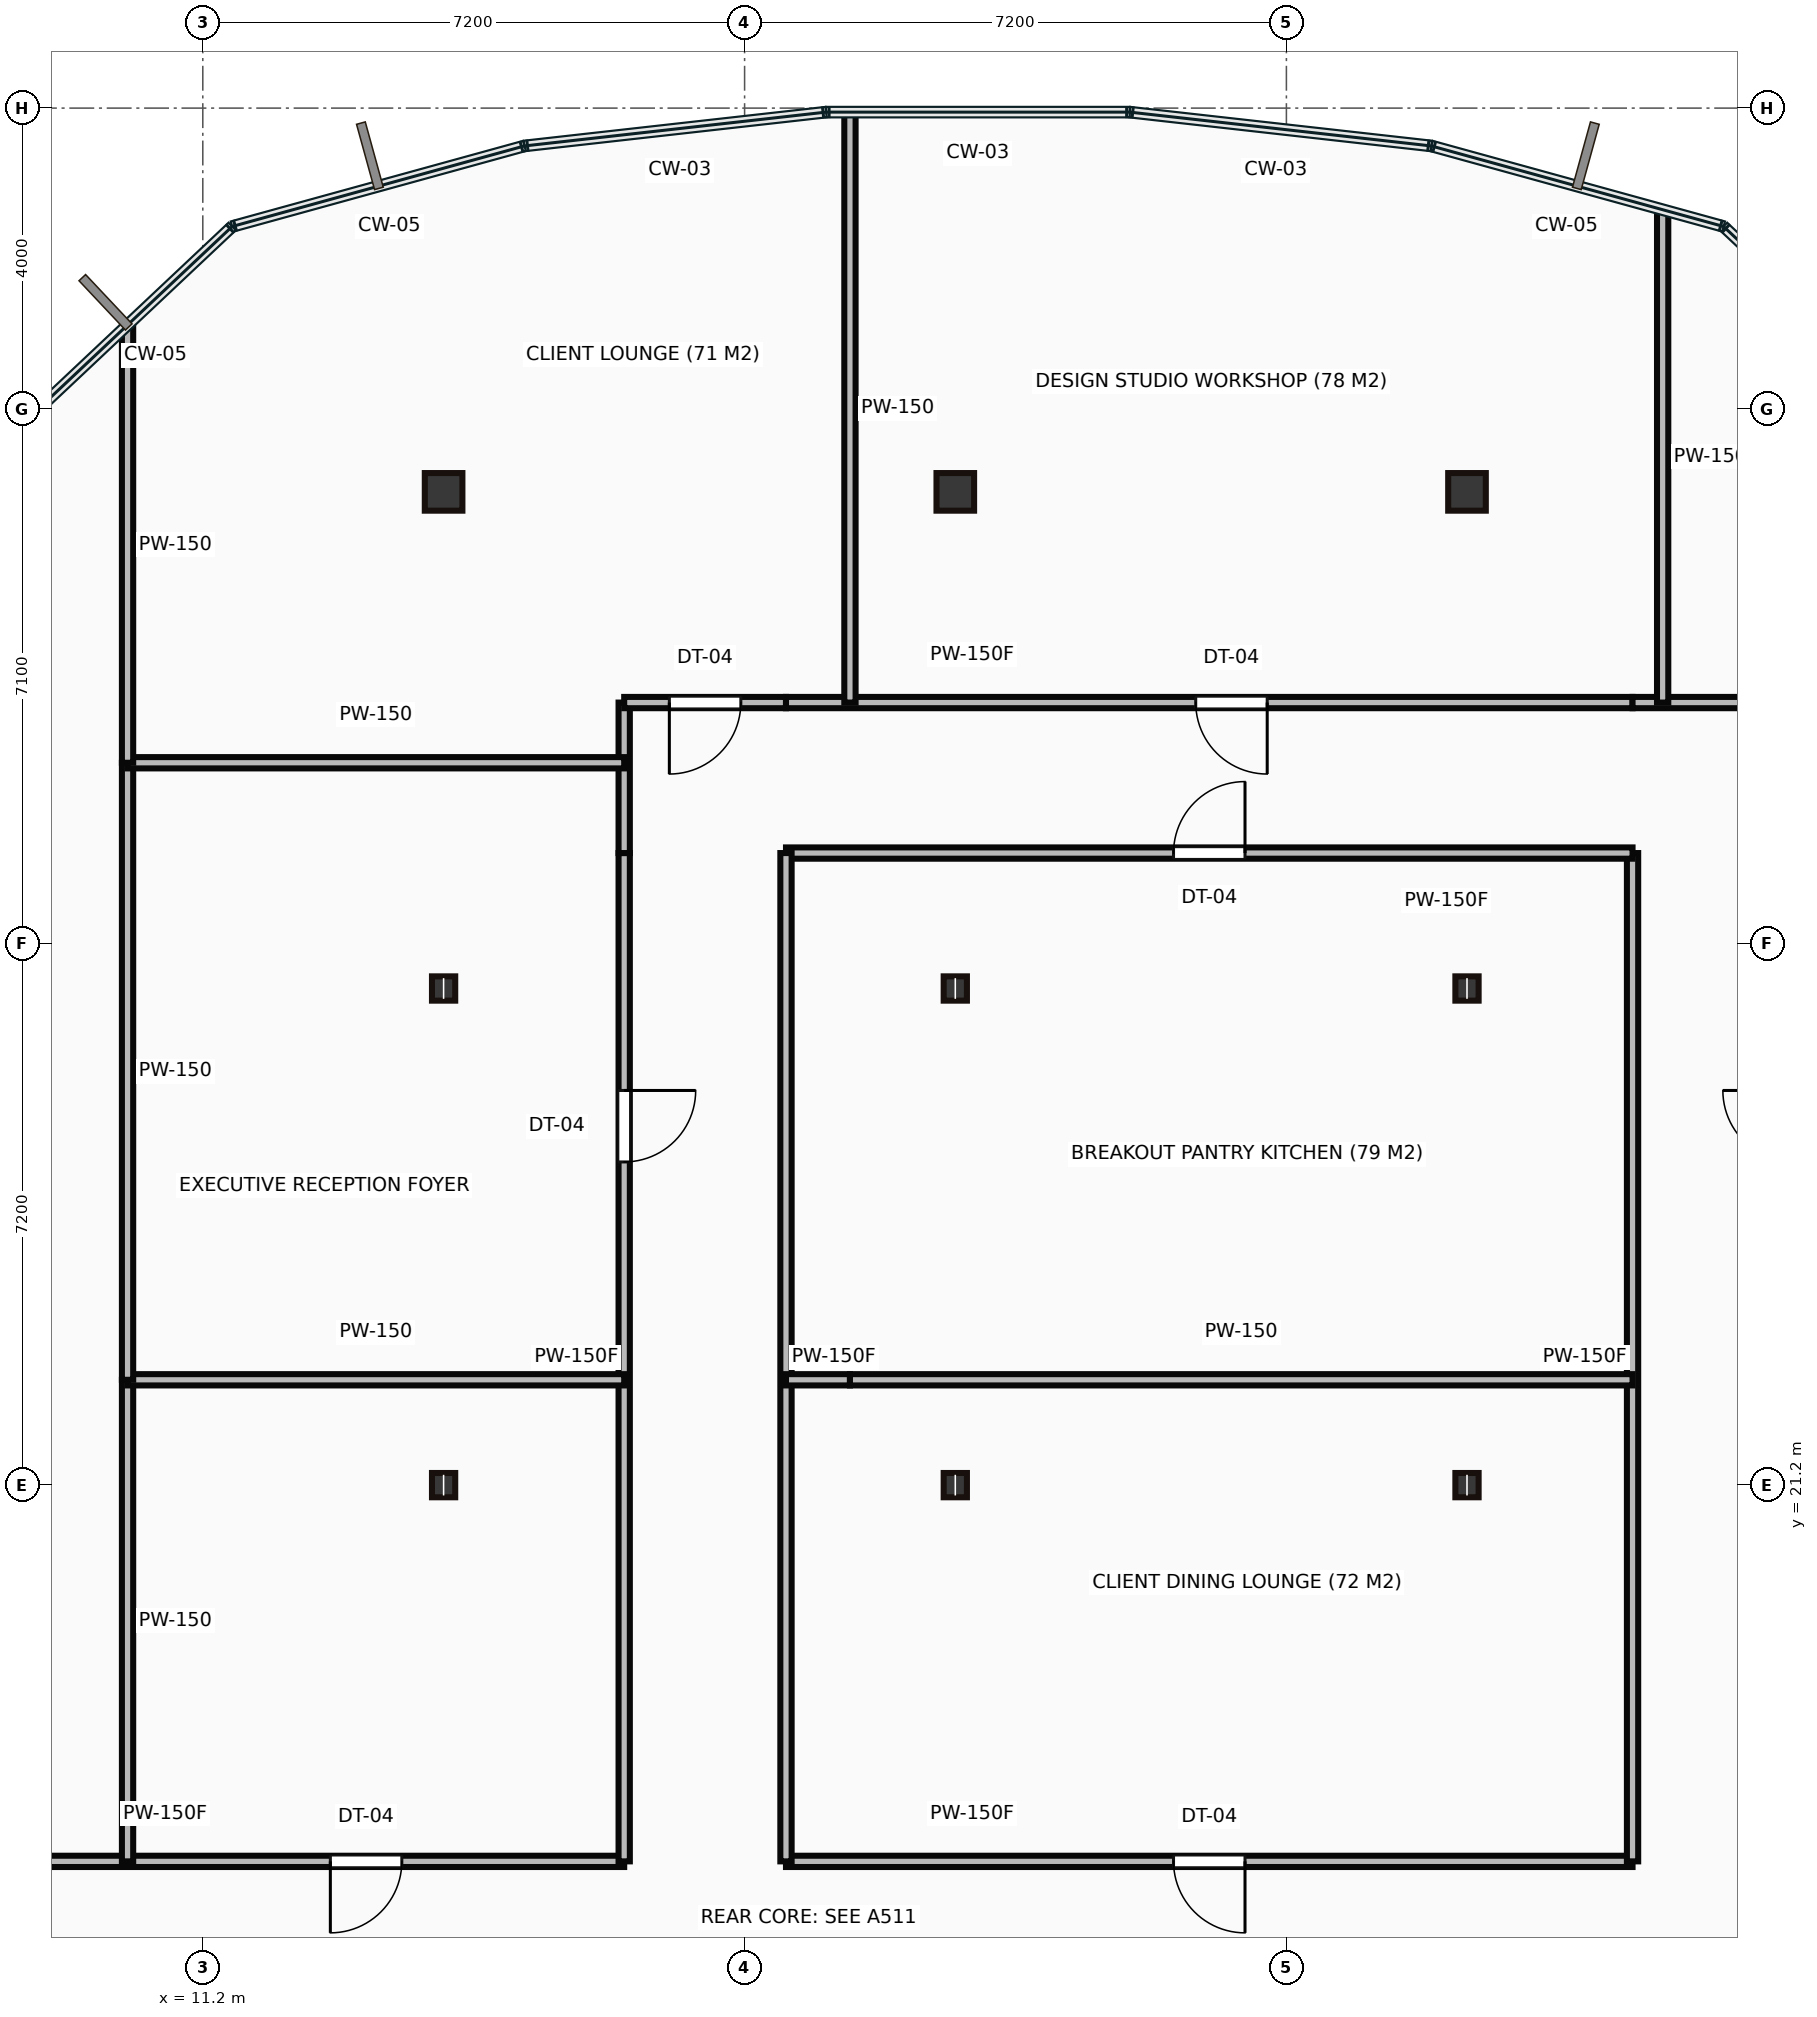
"""IFC4 building model, lengths in metres.
Left out: names, types, materials, properties, quantities, classifications, styles, units other than length and angle.
Written with IfcOpenShell. Run it as: python <this file> out.ifc"""

import sys

from ifc_helpers import new_model, si_unit, direction, frame, frame_2d, origin, origin_2d, place, context, subcontext, project, spatial, rectangle, hollow_rectangle, i_section, extrude, source, transform, mapped, element, fill, save


model = new_model("IFC4")
c1 = context("Model", 3, precision=1e-05, world=origin(), true_north=direction((0.0, 1.0)))
c2 = subcontext(c1, "Body", "Model", "MODEL_VIEW")
j1 = project(units=[si_unit("LENGTHUNIT", "METRE"), si_unit("PLANEANGLEUNIT", "RADIAN")], contexts=[c1])
p1 = place(None, origin())
s1 = spatial("IfcSite", under=j1, at=p1, CompositionType="ELEMENT")
p2 = place(p1, origin())
s2 = spatial("IfcBuilding", under=s1, at=p2, CompositionType="ELEMENT")
p3 = place(p2, frame((0.0, 0.0, 269.75)))
s3 = spatial("IfcBuildingStorey", under=s2, at=p3, CompositionType="ELEMENT", Elevation=269.75)
m1 = source(origin(), c2, "Body", "SweptSolid", [
    extrude(i_section(OverallWidth=0.309, OverallDepth=0.323, WebThickness=0.014, FlangeThickness=0.023, at=origin_2d()), origin(), (0.0, 0.0, 1.0), 3.65),
])
for number, where, z_axis, x_axis in (
    (1, (14.4, 21.2, 0.0), (0.0, 0.0, 1.0), (1.0, 0.0, 0.0)),
    (2, (14.4, 27.8, 0.0), (0.0, 0.0, 1.0), (1.0, 0.0, 0.0)),
):
    element("IfcColumn", number, at=place(p3, frame(where, z_axis=z_axis, x_axis=x_axis)), inside=s3, PredefinedType="COLUMN", context=c2, shape_type="MappedRepresentation", body=[
        mapped(m1, transform((0.0, 0.0, 0.0))),
    ])
m2 = source(origin(), c2, "Body", "SweptSolid", [
    extrude(hollow_rectangle(XDim=0.5, YDim=0.5, WallThickness=0.022, at=origin_2d()), origin(), (0.0, 0.0, 1.0), 3.65),
])
p4 = place(p3, frame((14.4, 34.4, 0.0), z_axis=(0.0, 0.0, 1.0), x_axis=(1.0, 0.0, 0.0)))
e3 = element("IfcColumn", 3, at=p4, inside=s3, PredefinedType="COLUMN", context=c2, shape_type="MappedRepresentation", body=[
    mapped(m2, transform((0.0, 0.0, 0.0))),
])
for number, where, z_axis, x_axis in (
    (4, (21.2, 21.2, 0.0), (0.0, 0.0, 1.0), (1.0, 0.0, 0.0)),
    (5, (21.2, 27.8, 0.0), (0.0, 0.0, 1.0), (1.0, 0.0, 0.0)),
):
    element("IfcColumn", number, at=place(p3, frame(where, z_axis=z_axis, x_axis=x_axis)), inside=s3, PredefinedType="COLUMN", context=c2, shape_type="MappedRepresentation", body=[
        mapped(m1, transform((0.0, 0.0, 0.0))),
    ])
p5 = place(p3, frame((21.2, 34.4, 0.0), z_axis=(0.0, 0.0, 1.0), x_axis=(1.0, 0.0, 0.0)))
e6 = element("IfcColumn", 6, at=p5, inside=s3, PredefinedType="COLUMN", context=c2, shape_type="MappedRepresentation", body=[
    mapped(m2, transform((0.0, 0.0, 0.0))),
])
for number, where, z_axis, x_axis in (
    (7, (28.0, 21.2, 0.0), (0.0, 0.0, 1.0), (1.0, 0.0, 0.0)),
    (8, (28.0, 27.8, 0.0), (0.0, 0.0, 1.0), (1.0, 0.0, 0.0)),
):
    element("IfcColumn", number, at=place(p3, frame(where, z_axis=z_axis, x_axis=x_axis)), inside=s3, PredefinedType="COLUMN", context=c2, shape_type="MappedRepresentation", body=[
        mapped(m1, transform((0.0, 0.0, 0.0))),
    ])
p6 = place(p3, frame((28.0, 34.4, 0.0), z_axis=(0.0, 0.0, 1.0), x_axis=(1.0, 0.0, 0.0)))
e9 = element("IfcColumn", 9, at=p6, inside=s3, PredefinedType="COLUMN", context=c2, shape_type="MappedRepresentation", body=[
    mapped(m2, transform((0.0, 0.0, 0.0))),
])
m3 = source(origin(), c2, "Body", "SweptSolid", [
    extrude(rectangle(XDim=12.2, YDim=0.15, at=frame_2d((6.1, 0.0))), origin(), (0.0, 0.0, 1.0), 3.4),
])
p7 = place(p3, frame((4.6, 16.2, 0.0), z_axis=(0.0, 0.0, 1.0), x_axis=(1.0, 0.0, 0.0)))
e10 = element("IfcWall", 10, at=p7, inside=s3, PredefinedType="PARTITIONING", context=c2, shape_type="MappedRepresentation", body=[
    mapped(m3, transform((0.0, 0.0, 0.0))),
])
p8 = place(p7, frame((2.455, 0.0, 0.0)))
e11 = element("IfcOpeningElement", 11, at=p8, cuts=e10, PredefinedType="OPENING", context=c2, shape_type="SweptSolid", body=[
    extrude(rectangle(XDim=0.95, YDim=2.15, at=frame_2d((0.475, 1.075))), frame((0.0, 0.085, 0.0), z_axis=(0.0, -1.0, 0.0), x_axis=(1.0, 0.0, 0.0)), (0.0, 0.0, 1.0), 0.17),
])
p9 = place(p7, frame((8.295, 0.0, 0.0)))
e12 = element("IfcOpeningElement", 12, at=p9, cuts=e10, PredefinedType="OPENING", context=c2, shape_type="SweptSolid", body=[
    extrude(rectangle(XDim=0.95, YDim=2.15, at=frame_2d((0.475, 1.075))), frame((0.0, 0.085, 0.0), z_axis=(0.0, -1.0, 0.0), x_axis=(1.0, 0.0, 0.0)), (0.0, 0.0, 1.0), 0.17),
])
m4 = source(origin(), c2, "Body", "SweptSolid", [
    extrude(rectangle(XDim=13.4, YDim=0.15, at=frame_2d((6.7, 0.0))), origin(), (0.0, 0.0, 1.0), 3.4),
])
p10 = place(p3, frame((16.8, 16.2, 0.0), z_axis=(0.0, 0.0, 1.0), x_axis=(0.0, 1.0, 0.0)))
e13 = element("IfcWall", 13, at=p10, inside=s3, PredefinedType="PARTITIONING", context=c2, shape_type="MappedRepresentation", body=[
    mapped(m4, transform((0.0, 0.0, 0.0))),
])
p11 = place(p10, frame((9.295, 0.0, 0.0)))
e14 = element("IfcOpeningElement", 14, at=p11, cuts=e13, PredefinedType="OPENING", context=c2, shape_type="SweptSolid", body=[
    extrude(rectangle(XDim=0.95, YDim=2.15, at=frame_2d((0.475, 1.075))), frame((0.0, 0.085, 0.0), z_axis=(0.0, -1.0, 0.0), x_axis=(1.0, 0.0, 0.0)), (0.0, 0.0, 1.0), 0.17),
])
m5 = source(origin(), c2, "Body", "SweptSolid", [
    extrude(rectangle(XDim=2.0, YDim=0.15, at=frame_2d((1.0, 0.0))), origin(), (0.0, 0.0, 1.0), 3.4),
])
p12 = place(p3, frame((16.8, 29.6, 0.0), z_axis=(0.0, 0.0, 1.0), x_axis=(0.0, 1.0, 0.0)))
e15 = element("IfcWall", 15, at=p12, inside=s3, PredefinedType="PARTITIONING", context=c2, shape_type="MappedRepresentation", body=[
    mapped(m5, transform((0.0, 0.0, 0.0))),
])
m6 = source(origin(), c2, "Body", "SweptSolid", [
    extrude(rectangle(XDim=2.15, YDim=0.15, at=frame_2d((1.075, 0.0))), origin(), (0.0, 0.0, 1.0), 3.4),
])
p13 = place(p3, frame((16.8, 31.6, 0.0), z_axis=(0.0, 0.0, 1.0), x_axis=(1.0, 0.0, 0.0)))
e16 = element("IfcWall", 16, at=p13, inside=s3, PredefinedType="PARTITIONING", context=c2, shape_type="MappedRepresentation", body=[
    mapped(m6, transform((0.0, 0.0, 0.0))),
])
p14 = place(p13, frame((0.6, 0.0, 0.0)))
e17 = element("IfcOpeningElement", 17, at=p14, cuts=e16, PredefinedType="OPENING", context=c2, shape_type="SweptSolid", body=[
    extrude(rectangle(XDim=0.95, YDim=2.15, at=frame_2d((0.475, 1.075))), frame((0.0, 0.085, 0.0), z_axis=(0.0, -1.0, 0.0), x_axis=(1.0, 0.0, 0.0)), (0.0, 0.0, 1.0), 0.17),
])
m7 = source(origin(), c2, "Body", "SweptSolid", [
    extrude(rectangle(XDim=11.25, YDim=0.15, at=frame_2d((5.625, 0.0))), origin(), (0.0, 0.0, 1.0), 3.4),
])
p15 = place(p3, frame((18.95, 31.6, 0.0), z_axis=(0.0, 0.0, 1.0), x_axis=(1.0, 0.0, 0.0)))
e18 = element("IfcWall", 18, at=p15, inside=s3, PredefinedType="PARTITIONING", context=c2, shape_type="MappedRepresentation", body=[
    mapped(m7, transform((0.0, 0.0, 0.0))),
])
p16 = place(p15, frame((5.445, 0.0, 0.0)))
e19 = element("IfcOpeningElement", 19, at=p16, cuts=e18, PredefinedType="OPENING", context=c2, shape_type="SweptSolid", body=[
    extrude(rectangle(XDim=0.95, YDim=2.15, at=frame_2d((0.475, 1.075))), frame((0.0, 0.085, 0.0), z_axis=(0.0, -1.0, 0.0), x_axis=(1.0, 0.0, 0.0)), (0.0, 0.0, 1.0), 0.17),
])
m8 = source(origin(), c2, "Body", "SweptSolid", [
    extrude(rectangle(XDim=2.15, YDim=0.15, at=frame_2d((1.075, 0.0))), origin(), (0.0, 0.0, 1.0), 3.4),
])
p17 = place(p3, frame((30.2, 31.6, 0.0), z_axis=(0.0, 0.0, 1.0), x_axis=(1.0, 0.0, 0.0)))
e20 = element("IfcWall", 20, at=p17, inside=s3, PredefinedType="PARTITIONING", context=c2, shape_type="MappedRepresentation", body=[
    mapped(m8, transform((0.0, 0.0, 0.0))),
])
p18 = place(p3, frame((18.95, 16.2, 0.0), z_axis=(0.0, 0.0, 1.0), x_axis=(1.0, 0.0, 0.0)))
e21 = element("IfcWall", 21, at=p18, inside=s3, PredefinedType="PARTITIONING", context=c2, shape_type="MappedRepresentation", body=[
    mapped(m7, transform((0.0, 0.0, 0.0))),
])
p19 = place(p18, frame((5.15, 0.0, 0.0)))
e22 = element("IfcOpeningElement", 22, at=p19, cuts=e21, PredefinedType="OPENING", context=c2, shape_type="SweptSolid", body=[
    extrude(rectangle(XDim=0.95, YDim=2.15, at=frame_2d((0.475, 1.075))), frame((0.0, 0.085, 0.0), z_axis=(0.0, -1.0, 0.0), x_axis=(1.0, 0.0, 0.0)), (0.0, 0.0, 1.0), 0.17),
])
p20 = place(p3, frame((30.2, 16.2, 0.0), z_axis=(0.0, 0.0, 1.0), x_axis=(0.0, 1.0, 0.0)))
e23 = element("IfcWall", 23, at=p20, inside=s3, PredefinedType="PARTITIONING", context=c2, shape_type="MappedRepresentation", body=[
    mapped(m4, transform((0.0, 0.0, 0.0))),
])
p21 = place(p3, frame((30.2, 29.6, 0.0), z_axis=(0.0, 0.0, 1.0), x_axis=(-1.0, 0.0, 0.0)))
e24 = element("IfcWall", 24, at=p21, inside=s3, PredefinedType="PARTITIONING", context=c2, shape_type="MappedRepresentation", body=[
    mapped(m7, transform((0.0, 0.0, 0.0))),
])
p22 = place(p21, frame((5.15, 0.0, 0.0)))
e25 = element("IfcOpeningElement", 25, at=p22, cuts=e24, PredefinedType="OPENING", context=c2, shape_type="SweptSolid", body=[
    extrude(rectangle(XDim=0.95, YDim=2.15, at=frame_2d((0.475, 1.075))), frame((0.0, 0.085, 0.0), z_axis=(0.0, -1.0, 0.0), x_axis=(1.0, 0.0, 0.0)), (0.0, 0.0, 1.0), 0.17),
])
p23 = place(p3, frame((18.95, 29.6, 0.0), z_axis=(0.0, 0.0, 1.0), x_axis=(0.0, -1.0, 0.0)))
e26 = element("IfcWall", 26, at=p23, inside=s3, PredefinedType="PARTITIONING", context=c2, shape_type="MappedRepresentation", body=[
    mapped(m4, transform((0.0, 0.0, 0.0))),
])
m9 = source(origin(), c2, "Body", "SweptSolid", [
    extrude(rectangle(XDim=6.4, YDim=0.15, at=frame_2d((3.2, 0.0))), origin(), (0.0, 0.0, 1.0), 3.4),
])
p24 = place(p3, frame((10.2, 22.6, 0.0), z_axis=(0.0, 0.0, 1.0), x_axis=(0.0, -1.0, 0.0)))
e27 = element("IfcWall", 27, at=p24, inside=s3, PredefinedType="PARTITIONING", context=c2, shape_type="MappedRepresentation", body=[
    mapped(m9, transform((0.0, 0.0, 0.0))),
])
m10 = source(origin(), c2, "Body", "SweptSolid", [
    extrude(rectangle(XDim=6.6, YDim=0.15, at=frame_2d((3.3, 0.0))), origin(), (0.0, 0.0, 1.0), 3.4),
])
p25 = place(p3, frame((10.2, 22.6, 0.0), z_axis=(0.0, 0.0, 1.0), x_axis=(1.0, 0.0, 0.0)))
e28 = element("IfcWall", 28, at=p25, inside=s3, PredefinedType="PARTITIONING", context=c2, shape_type="MappedRepresentation", body=[
    mapped(m10, transform((0.0, 0.0, 0.0))),
])
m11 = source(origin(), c2, "Body", "SweptSolid", [
    extrude(rectangle(XDim=8.2, YDim=0.15, at=frame_2d((4.1, 0.0))), origin(), (0.0, 0.0, 1.0), 3.4),
])
p26 = place(p3, frame((10.2, 30.8, 0.0), z_axis=(0.0, 0.0, 1.0), x_axis=(0.0, -1.0, 0.0)))
e29 = element("IfcWall", 29, at=p26, inside=s3, PredefinedType="PARTITIONING", context=c2, shape_type="MappedRepresentation", body=[
    mapped(m11, transform((0.0, 0.0, 0.0))),
])
p27 = place(p3, frame((10.2, 30.8, 0.0), z_axis=(0.0, 0.0, 1.0), x_axis=(1.0, 0.0, 0.0)))
e30 = element("IfcWall", 30, at=p27, inside=s3, PredefinedType="PARTITIONING", context=c2, shape_type="MappedRepresentation", body=[
    mapped(m10, transform((0.0, 0.0, 0.0))),
])
m12 = source(origin(), c2, "Body", "SweptSolid", [
    extrude(rectangle(XDim=5.79, YDim=0.15, at=frame_2d((2.895, 0.0))), origin(), (0.0, 0.0, 1.0), 3.4),
])
p28 = place(p3, frame((10.2, 36.59, 0.0), z_axis=(0.0, 0.0, 1.0), x_axis=(0.0, -1.0, 0.0)))
e31 = element("IfcWall", 31, at=p28, inside=s3, PredefinedType="PARTITIONING", context=c2, shape_type="MappedRepresentation", body=[
    mapped(m12, transform((0.0, 0.0, 0.0))),
])
m13 = source(origin(), c2, "Body", "SweptSolid", [
    extrude(rectangle(XDim=0.85, YDim=0.15, at=frame_2d((0.425, 0.0))), origin(), (0.0, 0.0, 1.0), 3.4),
])
p29 = place(p3, frame((18.95, 22.6, 0.0), z_axis=(0.0, 0.0, 1.0), x_axis=(1.0, 0.0, 0.0)))
e32 = element("IfcWall", 32, at=p29, inside=s3, PredefinedType="PARTITIONING", context=c2, shape_type="MappedRepresentation", body=[
    mapped(m13, transform((0.0, 0.0, 0.0))),
])
m14 = source(origin(), c2, "Body", "SweptSolid", [
    extrude(rectangle(XDim=10.4, YDim=0.15, at=frame_2d((5.2, 0.0))), origin(), (0.0, 0.0, 1.0), 3.4),
])
p30 = place(p3, frame((19.8, 22.6, 0.0), z_axis=(0.0, 0.0, 1.0), x_axis=(1.0, 0.0, 0.0)))
e33 = element("IfcWall", 33, at=p30, inside=s3, PredefinedType="PARTITIONING", context=c2, shape_type="MappedRepresentation", body=[
    mapped(m14, transform((0.0, 0.0, 0.0))),
])
m15 = source(origin(), c2, "Body", "SweptSolid", [
    extrude(rectangle(XDim=7.827, YDim=0.15, at=frame_2d((3.913, 0.0))), origin(), (0.0, 0.0, 1.0), 3.4),
])
p31 = place(p3, frame((19.8, 39.427, 0.0), z_axis=(0.0, 0.0, 1.0), x_axis=(0.0, -1.0, 0.0)))
e34 = element("IfcWall", 34, at=p31, inside=s3, PredefinedType="PARTITIONING", context=c2, shape_type="MappedRepresentation", body=[
    mapped(m15, transform((0.0, 0.0, 0.0))),
])
m16 = source(origin(), c2, "Body", "SweptSolid", [
    extrude(rectangle(XDim=6.529, YDim=0.15, at=frame_2d((3.265, 0.0))), origin(), (0.0, 0.0, 1.0), 3.4),
])
p32 = place(p3, frame((30.6, 38.129, 0.0), z_axis=(0.0, 0.0, 1.0), x_axis=(0.0, -1.0, 0.0)))
e35 = element("IfcWall", 35, at=p32, inside=s3, PredefinedType="PARTITIONING", context=c2, shape_type="MappedRepresentation", body=[
    mapped(m16, transform((0.0, 0.0, 0.0))),
])
m17 = source(origin(), c2, "Body", "SweptSolid", [
    extrude(rectangle(XDim=0.95, YDim=2.15, at=frame_2d((0.475, 1.075))), frame((0.0, 0.025, 0.0), z_axis=(0.0, -1.0, 0.0), x_axis=(1.0, 0.0, 0.0)), (0.0, 0.0, 1.0), 0.05),
])
p33 = place(p9, origin())
e36 = element("IfcDoor", 36, at=p33, inside=s3, OperationType="SINGLE_SWING_LEFT", PredefinedType="DOOR", context=c2, shape_type="MappedRepresentation", body=[
    mapped(m17, transform((0.0, 0.0, 0.0))),
])
fill(e12, e36)
p34 = place(p11, origin())
e37 = element("IfcDoor", 37, at=p34, inside=s3, OperationType="SINGLE_SWING_RIGHT", PredefinedType="DOOR", context=c2, shape_type="MappedRepresentation", body=[
    mapped(m17, transform((0.0, 0.0, 0.0))),
])
fill(e14, e37)
p35 = place(p14, origin())
e38 = element("IfcDoor", 38, at=p35, inside=s3, OperationType="SINGLE_SWING_LEFT", PredefinedType="DOOR", context=c2, shape_type="MappedRepresentation", body=[
    mapped(m17, transform((0.0, 0.0, 0.0))),
])
fill(e17, e38)
p36 = place(p19, origin())
e39 = element("IfcDoor", 39, at=p36, inside=s3, OperationType="SINGLE_SWING_RIGHT", PredefinedType="DOOR", context=c2, shape_type="MappedRepresentation", body=[
    mapped(m17, transform((0.0, 0.0, 0.0))),
])
fill(e22, e39)
p37 = place(p22, origin())
e40 = element("IfcDoor", 40, at=p37, inside=s3, OperationType="SINGLE_SWING_LEFT", PredefinedType="DOOR", context=c2, shape_type="MappedRepresentation", body=[
    mapped(m17, transform((0.0, 0.0, 0.0))),
])
fill(e25, e40)
p38 = place(p16, origin())
e41 = element("IfcDoor", 41, at=p38, inside=s3, OperationType="SINGLE_SWING_RIGHT", PredefinedType="DOOR", context=c2, shape_type="MappedRepresentation", body=[
    mapped(m17, transform((0.0, 0.0, 0.0))),
])
fill(e19, e41)
save(model, sys.argv[1])
